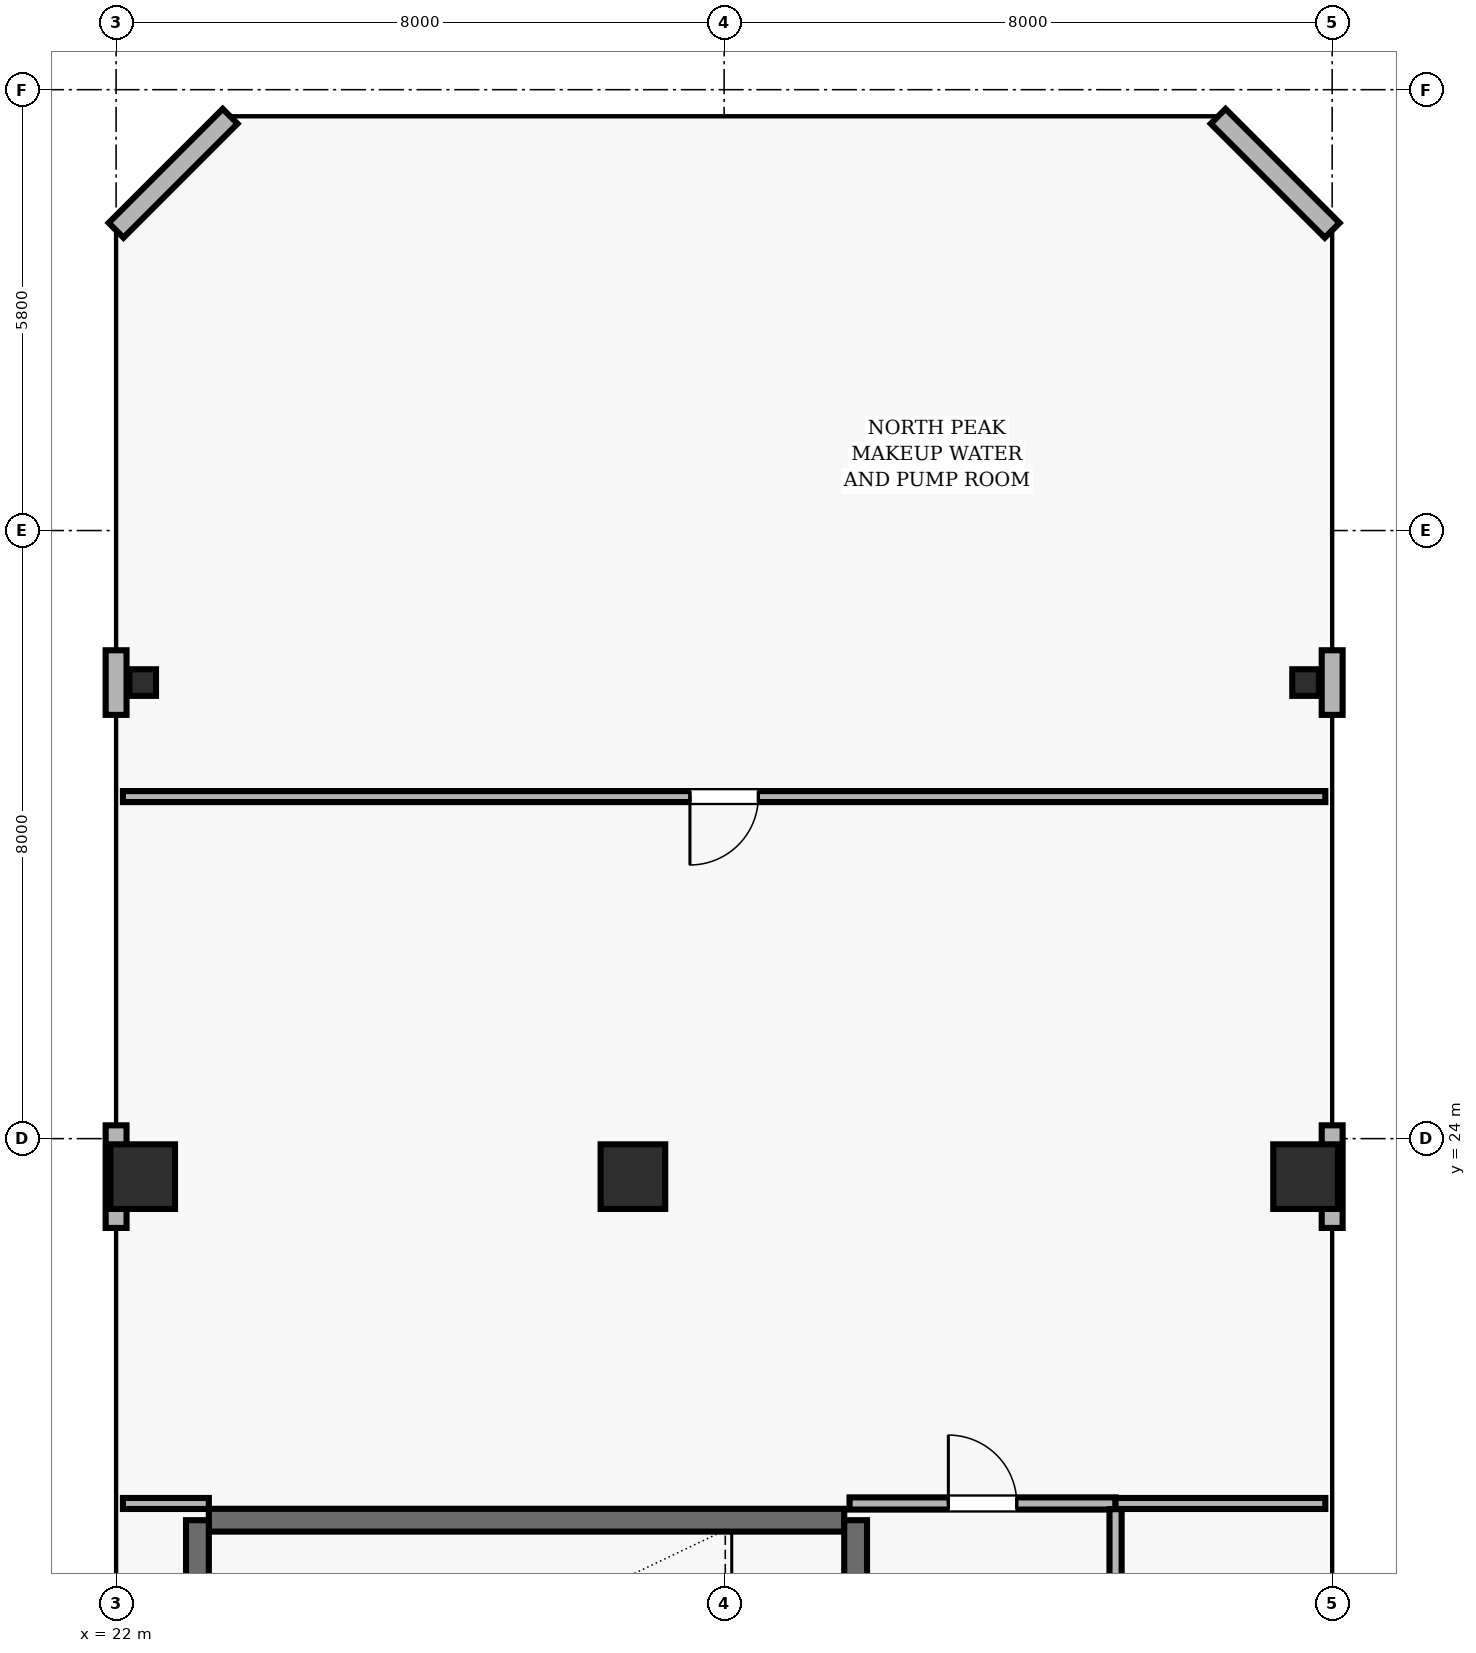
"""IFC4 building model, lengths in metres.
Left out: names, types, materials, properties, quantities, classifications, styles, units other than length and angle.
Written with IfcOpenShell. Run it as: python <this file> out.ifc"""

import sys

from ifc_helpers import new_model, si_unit, direction, frame, frame_2d, origin, origin_2d, place, context, subcontext, project, spatial, rectangle, hollow_rectangle, extrude, element, fill, save


model = new_model("IFC4")
c1 = context("Model", 3, precision=1e-05, world=origin(), true_north=direction((0.0, 1.0)))
c2 = subcontext(c1, "Body", "Model", "MODEL_VIEW")
j1 = project(units=[si_unit("LENGTHUNIT", "METRE"), si_unit("PLANEANGLEUNIT", "RADIAN")], contexts=[c1])
p1 = place(None, origin())
s1 = spatial("IfcSite", under=j1, at=p1, CompositionType="ELEMENT")
p2 = place(p1, origin())
s2 = spatial("IfcBuilding", under=s1, at=p2, CompositionType="ELEMENT")
p3 = place(p2, frame((0.0, 0.0, 316.7)))
s3 = spatial("IfcBuildingStorey", under=s2, at=p3, CompositionType="ELEMENT", Elevation=316.7)
for number, where, z_axis, x_axis in (
    (1, (22.35, 23.5, 0.0), (0.0, 0.0, 1.0), (1.0, 0.0, 0.0)),
    (2, (28.8, 23.5, 0.0), (0.0, 0.0, 1.0), (1.0, 0.0, 0.0)),
    (3, (37.65, 23.5, 0.0), (0.0, 0.0, 1.0), (1.0, 0.0, 0.0)),
):
    element("IfcColumn", number, at=place(p3, frame(where, z_axis=z_axis, x_axis=x_axis)), inside=s3, PredefinedType="COLUMN", context=c2, shape_type="SweptSolid", body=[
        extrude(rectangle(XDim=0.85, YDim=0.85, at=origin_2d()), origin(), (0.0, 0.0, 1.0), 5.0),
    ])
for number, where, z_axis, x_axis in (
    (4, (22.35, 30.0, 0.0), (0.0, 0.0, 1.0), (1.0, 0.0, 0.0)),
    (5, (37.65, 30.0, 0.0), (0.0, 0.0, 1.0), (1.0, 0.0, 0.0)),
):
    element("IfcColumn", number, at=place(p3, frame(where, z_axis=z_axis, x_axis=x_axis)), inside=s3, PredefinedType="COLUMN", context=c2, shape_type="SweptSolid", body=[
        extrude(hollow_rectangle(XDim=0.35, YDim=0.35, WallThickness=0.016, at=origin_2d()), origin(), (0.0, 0.0, 1.0), 5.0),
    ])
p4 = place(p3, frame((38.0, 22.825, 0.0), z_axis=(0.0, 0.0, 1.0), x_axis=(0.0, 1.0, 0.0)))
e6 = element("IfcWall", 6, at=p4, inside=s3, PredefinedType="SOLIDWALL", context=c2, shape_type="SweptSolid", body=[
    extrude(rectangle(XDim=1.35, YDim=0.275, at=frame_2d((0.675, 0.0))), origin(), (0.0, 0.0, 1.0), 4.74),
])
p5 = place(p3, frame((38.0, 29.575, 0.0), z_axis=(0.0, 0.0, 1.0), x_axis=(0.0, 1.0, 0.0)))
e7 = element("IfcWall", 7, at=p5, inside=s3, PredefinedType="SOLIDWALL", context=c2, shape_type="SweptSolid", body=[
    extrude(rectangle(XDim=0.85, YDim=0.275, at=frame_2d((0.425, 0.0))), origin(), (0.0, 0.0, 1.0), 4.74),
])
for number, where, z_axis, x_axis in (
    (8, (38.0, 35.95, 0.0), (0.0, 0.0, 1.0), (-0.707, 0.707, 0.0)),
    (9, (23.5, 37.45, 0.0), (0.0, 0.0, 1.0), (-0.707, -0.707, 0.0)),
):
    element("IfcWall", number, at=place(p3, frame(where, z_axis=z_axis, x_axis=x_axis)), inside=s3, PredefinedType="SOLIDWALL", context=c2, shape_type="SweptSolid", body=[
        extrude(rectangle(XDim=2.121, YDim=0.275, at=frame_2d((1.061, 0.0))), origin(), (0.0, 0.0, 1.0), 4.74),
    ])
p6 = place(p3, frame((22.0, 30.425, 0.0), z_axis=(0.0, 0.0, 1.0), x_axis=(0.0, -1.0, 0.0)))
e10 = element("IfcWall", 10, at=p6, inside=s3, PredefinedType="SOLIDWALL", context=c2, shape_type="SweptSolid", body=[
    extrude(rectangle(XDim=0.85, YDim=0.275, at=frame_2d((0.425, 0.0))), origin(), (0.0, 0.0, 1.0), 4.74),
])
p7 = place(p3, frame((22.0, 24.175, 0.0), z_axis=(0.0, 0.0, 1.0), x_axis=(0.0, -1.0, 0.0)))
e11 = element("IfcWall", 11, at=p7, inside=s3, PredefinedType="SOLIDWALL", context=c2, shape_type="SweptSolid", body=[
    extrude(rectangle(XDim=1.35, YDim=0.275, at=frame_2d((0.675, 0.0))), origin(), (0.0, 0.0, 1.0), 4.74),
])
p8 = place(p3, frame((31.58, 18.98, 0.0), z_axis=(0.0, 0.0, 1.0), x_axis=(-1.0, 0.0, 0.0)))
e12 = element("IfcWall", 12, at=p8, inside=s3, PredefinedType="SHEAR", context=c2, shape_type="SweptSolid", body=[
    extrude(rectangle(XDim=8.36, YDim=0.3, at=frame_2d((4.18, 0.0))), origin(), (0.0, 0.0, 1.0), 4.74),
])
p9 = place(p3, frame((23.07, 18.98, 0.0), z_axis=(0.0, 0.0, 1.0), x_axis=(0.0, -1.0, 0.0)))
e13 = element("IfcWall", 13, at=p9, inside=s3, PredefinedType="SHEAR", context=c2, shape_type="SweptSolid", body=[
    extrude(rectangle(XDim=3.51, YDim=0.3, at=frame_2d((1.755, 0.0))), origin(), (0.0, 0.0, 1.0), 4.74),
])
p10 = place(p3, frame((31.73, 15.47, 0.0), z_axis=(0.0, 0.0, 1.0), x_axis=(0.0, 1.0, 0.0)))
e14 = element("IfcWall", 14, at=p10, inside=s3, PredefinedType="SHEAR", context=c2, shape_type="SweptSolid", body=[
    extrude(rectangle(XDim=3.51, YDim=0.3, at=frame_2d((1.755, 0.0))), origin(), (0.0, 0.0, 1.0), 4.74),
])
p11 = place(p10, frame((1.18, 0.0, 0.0)))
e15 = element("IfcOpeningElement", 15, at=p11, cuts=e14, PredefinedType="OPENING", context=c2, shape_type="SweptSolid", body=[
    extrude(rectangle(XDim=1.15, YDim=2.15, at=frame_2d((0.575, 1.075))), frame((0.0, 0.16, 0.0), z_axis=(0.0, -1.0, 0.0), x_axis=(1.0, 0.0, 0.0)), (0.0, 0.0, 1.0), 0.32),
])
p12 = place(p3, frame((22.09, 19.2, 0.0), z_axis=(0.0, 0.0, 1.0), x_axis=(1.0, 0.0, 0.0)))
e16 = element("IfcWall", 16, at=p12, inside=s3, PredefinedType="PARTITIONING", context=c2, shape_type="SweptSolid", body=[
    extrude(rectangle(XDim=1.13, YDim=0.145, at=frame_2d((0.565, 0.0))), origin(), (0.0, 0.0, 1.0), 4.74),
])
p13 = place(p3, frame((31.65, 19.2, 0.0), z_axis=(0.0, 0.0, 1.0), x_axis=(1.0, 0.0, 0.0)))
e17 = element("IfcWall", 17, at=p13, inside=s3, PredefinedType="PARTITIONING", context=c2, shape_type="SweptSolid", body=[
    extrude(rectangle(XDim=3.5, YDim=0.16, at=frame_2d((1.75, 0.0))), origin(), (0.0, 0.0, 1.0), 4.74),
])
p14 = place(p13, frame((1.3, 0.0, 0.0)))
e18 = element("IfcOpeningElement", 18, at=p14, cuts=e17, PredefinedType="OPENING", context=c2, shape_type="SweptSolid", body=[
    extrude(rectangle(XDim=0.9, YDim=2.1, at=frame_2d((0.45, 1.05))), frame((0.0, 0.09, 0.0), z_axis=(0.0, -1.0, 0.0), x_axis=(1.0, 0.0, 0.0)), (0.0, 0.0, 1.0), 0.18),
])
p15 = place(p3, frame((35.15, 19.2, 0.0), z_axis=(0.0, 0.0, 1.0), x_axis=(1.0, 0.0, 0.0)))
e19 = element("IfcWall", 19, at=p15, inside=s3, PredefinedType="PARTITIONING", context=c2, shape_type="SweptSolid", body=[
    extrude(rectangle(XDim=2.76, YDim=0.145, at=frame_2d((1.38, 0.0))), origin(), (0.0, 0.0, 1.0), 4.74),
])
p16 = place(p3, frame((37.91, 28.5, 0.0), z_axis=(0.0, 0.0, 1.0), x_axis=(-1.0, 0.0, 0.0)))
e20 = element("IfcWall", 20, at=p16, inside=s3, PredefinedType="PARTITIONING", context=c2, shape_type="SweptSolid", body=[
    extrude(rectangle(XDim=15.82, YDim=0.145, at=frame_2d((7.91, 0.0))), origin(), (0.0, 0.0, 1.0), 4.74),
])
p17 = place(p16, frame((7.46, 0.0, 0.0)))
e21 = element("IfcOpeningElement", 21, at=p17, cuts=e20, PredefinedType="OPENING", context=c2, shape_type="SweptSolid", body=[
    extrude(rectangle(XDim=0.9, YDim=2.1, at=frame_2d((0.45, 1.05))), frame((0.0, 0.083, 0.0), z_axis=(0.0, -1.0, 0.0), x_axis=(1.0, 0.0, 0.0)), (0.0, 0.0, 1.0), 0.165),
])
p18 = place(p3, frame((35.15, 17.62, 0.0), z_axis=(0.0, 0.0, 1.0), x_axis=(0.0, 1.0, 0.0)))
e22 = element("IfcWall", 22, at=p18, inside=s3, PredefinedType="PARTITIONING", context=c2, shape_type="SweptSolid", body=[
    extrude(rectangle(XDim=1.505, YDim=0.16, at=frame_2d((0.752, 0.0))), origin(), (0.0, 0.0, 1.0), 4.74),
])
p19 = place(p14, origin())
e23 = element("IfcDoor", 23, at=p19, inside=s3, OperationType="SINGLE_SWING_LEFT", PredefinedType="DOOR", context=c2, shape_type="SweptSolid", body=[
    extrude(rectangle(XDim=0.9, YDim=2.1, at=frame_2d((0.45, 1.05))), frame((0.0, 0.025, 0.0), z_axis=(0.0, -1.0, 0.0), x_axis=(1.0, 0.0, 0.0)), (0.0, 0.0, 1.0), 0.05),
])
fill(e18, e23)
p20 = place(p17, origin())
e24 = element("IfcDoor", 24, at=p20, inside=s3, OperationType="SINGLE_SWING_RIGHT", PredefinedType="DOOR", context=c2, shape_type="SweptSolid", body=[
    extrude(rectangle(XDim=0.9, YDim=2.1, at=frame_2d((0.45, 1.05))), frame((0.0, 0.025, 0.0), z_axis=(0.0, -1.0, 0.0), x_axis=(1.0, 0.0, 0.0)), (0.0, 0.0, 1.0), 0.05),
])
fill(e21, e24)
save(model, sys.argv[1])
